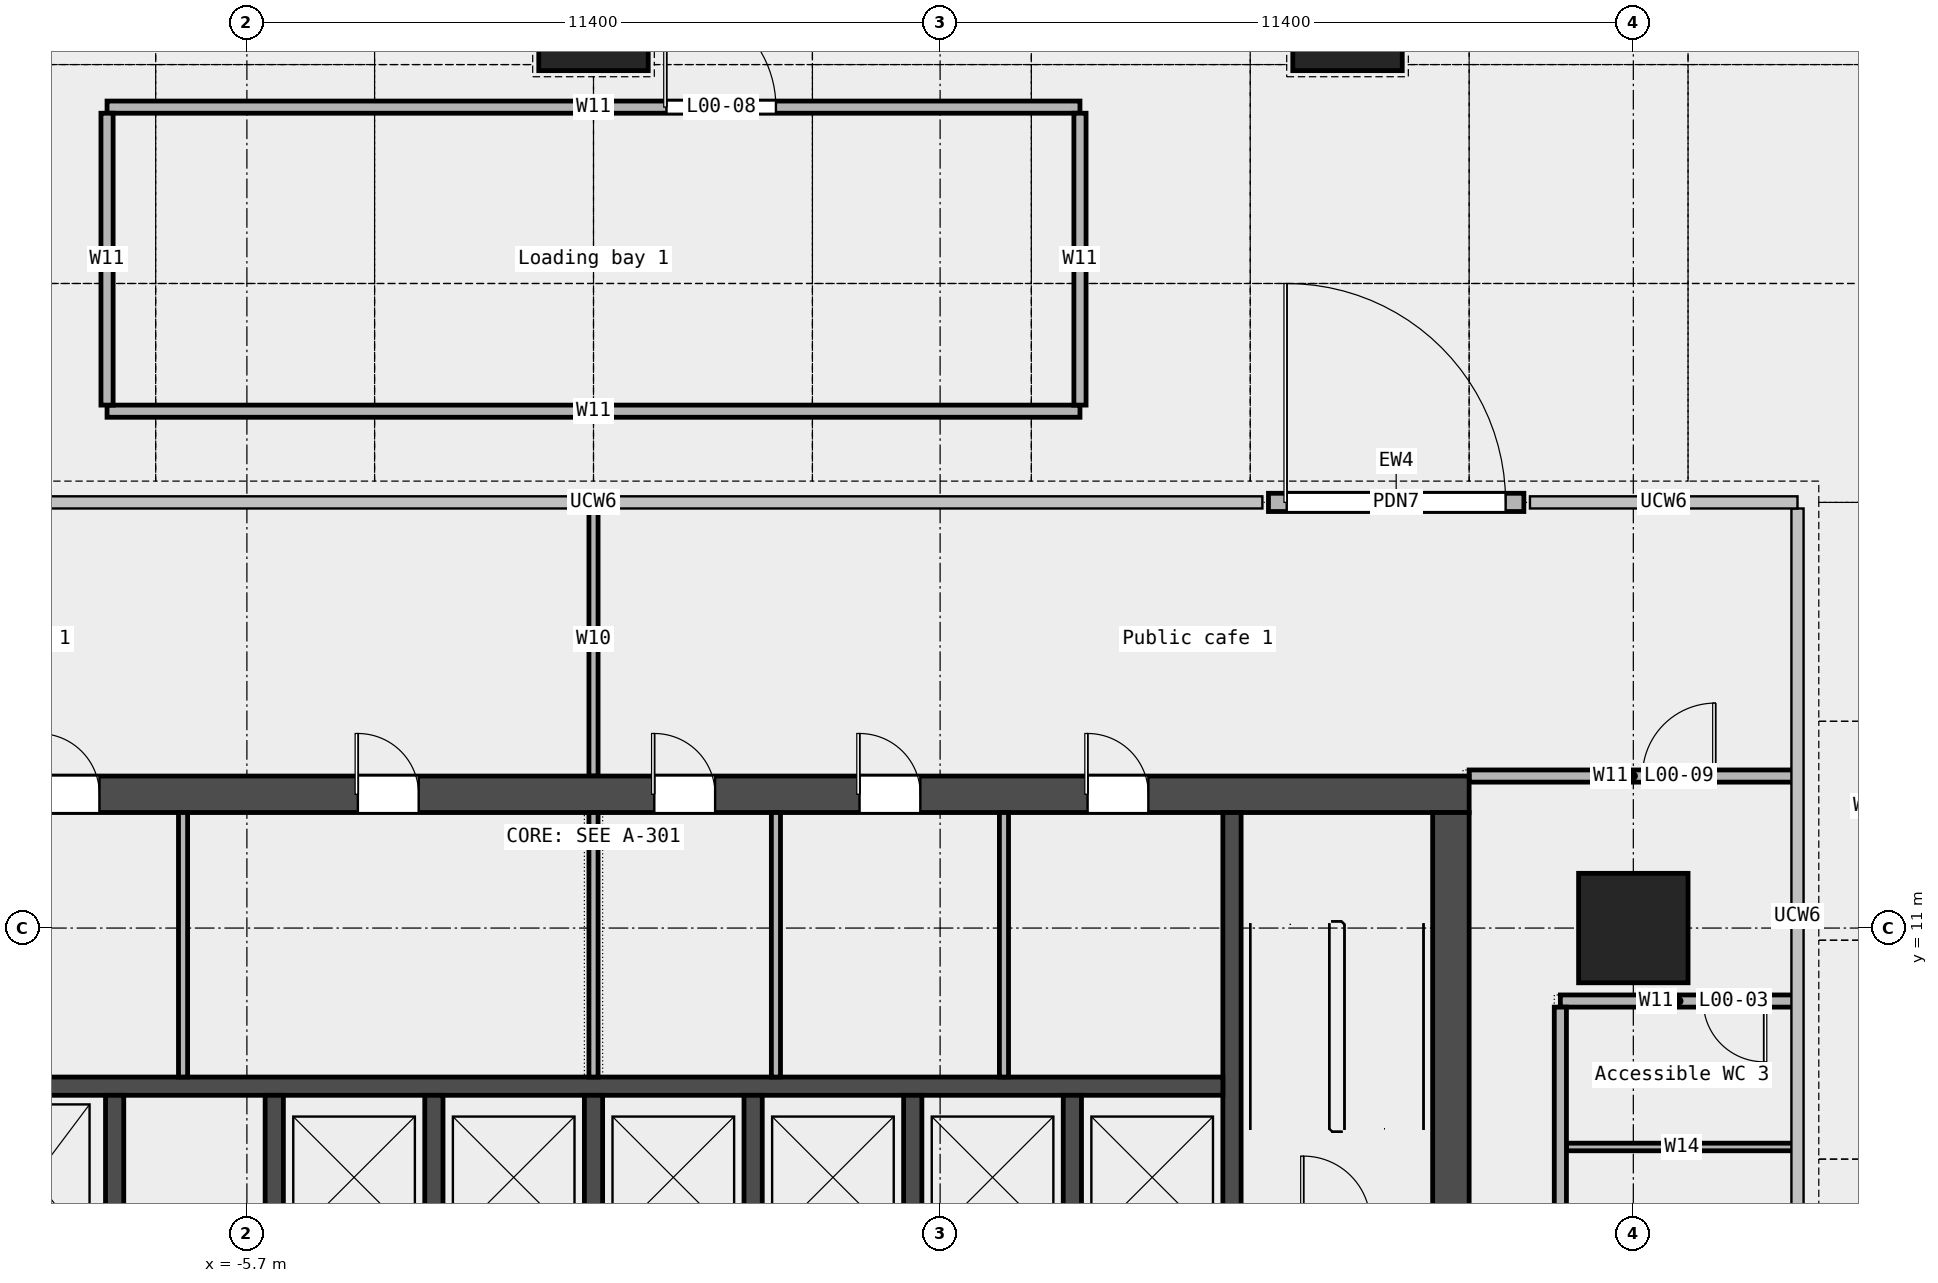
"""IFC4 building model, lengths in metres.
Left out: names, types, materials, properties, quantities, classifications, styles, units other than length and angle.
Written with IfcOpenShell. Run it as: python <this file> out.ifc"""

import sys

from ifc_helpers import new_model, si_unit, direction, frame, frame_2d, origin, origin_2d, place, context, subcontext, project, spatial, rectangle, extrude, element, fill, save


model = new_model("IFC4")
c1 = context("Model", 3, precision=1e-05, world=origin(), true_north=direction((0.0, 1.0)))
c2 = subcontext(c1, "Body", "Model", "MODEL_VIEW")
j1 = project(units=[si_unit("LENGTHUNIT", "METRE"), si_unit("PLANEANGLEUNIT", "RADIAN")], contexts=[c1])
p1 = place(None, origin())
s1 = spatial("IfcSite", under=j1, at=p1, CompositionType="ELEMENT")
p2 = place(p1, origin())
s2 = spatial("IfcBuilding", under=s1, at=p2, CompositionType="ELEMENT")
p3 = place(p2, origin())
s3 = spatial("IfcBuildingStorey", under=s2, at=p3, CompositionType="ELEMENT", Elevation=0.0)
for number, where, z_axis, x_axis in (
    (1, (12.4, 26.0, 0.0), (0.0, 0.0, 1.0), (1.0, 0.0, 0.0)),
    (2, (0.0, 26.0, 0.0), (0.0, 0.0, 1.0), (1.0, 0.0, 0.0)),
    (3, (17.1, 11.0, 0.0), (0.0, 0.0, 1.0), (1.0, 0.0, 0.0)),
):
    element("IfcColumn", number, at=place(p3, frame(where, z_axis=z_axis, x_axis=x_axis)), inside=s3, PredefinedType="COLUMN", context=c2, shape_type="SweptSolid", body=[
        extrude(rectangle(XDim=1.8, YDim=1.8, at=origin_2d()), origin(), (0.0, 0.0, 1.0), 7.8),
    ])
p4 = place(p3, frame((11.1, 18.0, 0.0), z_axis=(0.0, 0.0, 1.0), x_axis=(1.0, 0.0, 0.0)))
e4 = element("IfcWall", 4, at=p4, inside=s3, PredefinedType="STANDARD", context=c2, shape_type="SweptSolid", body=[
    extrude(rectangle(XDim=4.2, YDim=0.3, at=frame_2d((2.1, 0.0))), origin(), (0.0, 0.0, 1.0), 7.8),
])
p5 = place(p4, frame((0.3, 0.0, 0.0)))
e5 = element("IfcOpeningElement", 5, at=p5, cuts=e4, PredefinedType="OPENING", context=c2, shape_type="SweptSolid", body=[
    extrude(rectangle(XDim=3.6, YDim=4.5, at=frame_2d((1.8, 2.25))), frame((0.0, 0.162, 0.0), z_axis=(0.0, -1.0, 0.0), x_axis=(1.0, 0.0, 0.0)), (0.0, 0.0, 1.0), 0.324),
])
p6 = place(p3, frame((16.0, 7.4, 0.0), z_axis=(0.0, 0.0, 1.0), x_axis=(1.0, 0.0, 0.0)))
e6 = element("IfcWall", 6, at=p6, inside=s3, PredefinedType="PARTITIONING", context=c2, shape_type="SweptSolid", body=[
    extrude(rectangle(XDim=3.8, YDim=0.125, at=frame_2d((1.9, 0.0))), origin(), (0.0, 0.0, 1.0), 7.8),
])
p7 = place(p3, frame((15.9, 9.8, 0.0), z_axis=(0.0, 0.0, 1.0), x_axis=(1.0, 0.0, 0.0)))
e7 = element("IfcWall", 7, at=p7, inside=s3, PredefinedType="PARTITIONING", context=c2, shape_type="SweptSolid", body=[
    extrude(rectangle(XDim=3.9, YDim=0.2, at=frame_2d((1.95, 0.0))), origin(), (0.0, 0.0, 1.0), 7.8),
])
p8 = place(p7, frame((2.35, 0.0, 0.0)))
e8 = element("IfcOpeningElement", 8, at=p8, cuts=e7, PredefinedType="OPENING", context=c2, shape_type="SweptSolid", body=[
    extrude(rectangle(XDim=1.0, YDim=2.1, at=frame_2d((0.5, 1.05))), frame((0.0, 0.112, 0.0), z_axis=(0.0, -1.0, 0.0), x_axis=(1.0, 0.0, 0.0)), (0.0, 0.0, 1.0), 0.224),
])
p9 = place(p3, frame((14.4, 13.5, 0.0), z_axis=(0.0, 0.0, 1.0), x_axis=(1.0, 0.0, 0.0)))
e9 = element("IfcWall", 9, at=p9, inside=s3, PredefinedType="PARTITIONING", context=c2, shape_type="SweptSolid", body=[
    extrude(rectangle(XDim=5.4, YDim=0.2, at=frame_2d((2.7, 0.0))), origin(), (0.0, 0.0, 1.0), 7.8),
])
p10 = place(p9, frame((2.85, 0.0, 0.0)))
e10 = element("IfcOpeningElement", 10, at=p10, cuts=e9, PredefinedType="OPENING", context=c2, shape_type="SweptSolid", body=[
    extrude(rectangle(XDim=1.2, YDim=2.1, at=frame_2d((0.6, 1.05))), frame((0.0, 0.112, 0.0), z_axis=(0.0, -1.0, 0.0), x_axis=(1.0, 0.0, 0.0)), (0.0, 0.0, 1.0), 0.224),
])
p11 = place(p3, frame((-8.0, 19.5, 0.0), z_axis=(0.0, 0.0, 1.0), x_axis=(1.0, 0.0, 0.0)))
e11 = element("IfcWall", 11, at=p11, inside=s3, PredefinedType="PARTITIONING", context=c2, shape_type="SweptSolid", body=[
    extrude(rectangle(XDim=16.0, YDim=0.2, at=frame_2d((8.0, 0.0))), origin(), (0.0, 0.0, 1.0), 7.8),
])
p12 = place(p3, frame((-8.0, 24.5, 0.0), z_axis=(0.0, 0.0, 1.0), x_axis=(1.0, 0.0, 0.0)))
e12 = element("IfcWall", 12, at=p12, inside=s3, PredefinedType="PARTITIONING", context=c2, shape_type="SweptSolid", body=[
    extrude(rectangle(XDim=16.0, YDim=0.2, at=frame_2d((8.0, 0.0))), origin(), (0.0, 0.0, 1.0), 7.8),
])
p13 = place(p12, frame((9.2, 0.0, 0.0)))
e13 = element("IfcOpeningElement", 13, at=p13, cuts=e12, PredefinedType="OPENING", context=c2, shape_type="SweptSolid", body=[
    extrude(rectangle(XDim=1.8, YDim=2.1, at=frame_2d((0.9, 1.05))), frame((0.0, 0.112, 0.0), z_axis=(0.0, -1.0, 0.0), x_axis=(1.0, 0.0, 0.0)), (0.0, 0.0, 1.0), 0.224),
])
p14 = place(p3, frame((-8.0, 19.6, 0.0), z_axis=(0.0, 0.0, 1.0), x_axis=(0.0, 1.0, 0.0)))
e14 = element("IfcWall", 14, at=p14, inside=s3, PredefinedType="PARTITIONING", context=c2, shape_type="SweptSolid", body=[
    extrude(rectangle(XDim=4.8, YDim=0.2, at=frame_2d((2.4, 0.0))), origin(), (0.0, 0.0, 1.0), 7.8),
])
p15 = place(p3, frame((0.0, 13.5, 0.0), z_axis=(0.0, 0.0, 1.0), x_axis=(0.0, 1.0, 0.0)))
e15 = element("IfcWall", 15, at=p15, inside=s3, PredefinedType="PARTITIONING", context=c2, shape_type="SweptSolid", body=[
    extrude(rectangle(XDim=4.5, YDim=0.15, at=frame_2d((2.25, 0.0))), origin(), (0.0, 0.0, 1.0), 7.8),
])
p16 = place(p3, frame((8.0, 19.6, 0.0), z_axis=(0.0, 0.0, 1.0), x_axis=(0.0, 1.0, 0.0)))
e16 = element("IfcWall", 16, at=p16, inside=s3, PredefinedType="PARTITIONING", context=c2, shape_type="SweptSolid", body=[
    extrude(rectangle(XDim=4.8, YDim=0.2, at=frame_2d((2.4, 0.0))), origin(), (0.0, 0.0, 1.0), 7.8),
])
p17 = place(p3, frame((15.9, -7.1, 0.0), z_axis=(0.0, 0.0, 1.0), x_axis=(0.0, 1.0, 0.0)))
e17 = element("IfcWall", 17, at=p17, inside=s3, PredefinedType="PARTITIONING", context=c2, shape_type="SweptSolid", body=[
    extrude(rectangle(XDim=16.8, YDim=0.2, at=frame_2d((8.4, 0.0))), origin(), (0.0, 0.0, 1.0), 7.8),
])
p18 = place(p17, frame((8.25, 0.0, 0.0)))
e18 = element("IfcOpeningElement", 18, at=p18, cuts=e17, PredefinedType="OPENING", context=c2, shape_type="SweptSolid", body=[
    extrude(rectangle(XDim=0.9, YDim=2.1, at=frame_2d((0.45, 1.05))), frame((0.0, 0.112, 0.0), z_axis=(0.0, -1.0, 0.0), x_axis=(1.0, 0.0, 0.0)), (0.0, 0.0, 1.0), 0.224),
])
p19 = place(p17, frame((2.1, 0.0, 0.0)))
e19 = element("IfcOpeningElement", 19, at=p19, cuts=e17, PredefinedType="OPENING", context=c2, shape_type="SweptSolid", body=[
    extrude(rectangle(XDim=0.9, YDim=2.1, at=frame_2d((0.45, 1.05))), frame((0.0, 0.112, 0.0), z_axis=(0.0, -1.0, 0.0), x_axis=(1.0, 0.0, 0.0)), (0.0, 0.0, 1.0), 0.224),
])
p20 = place(p17, frame((12.35, 0.0, 0.0)))
e20 = element("IfcOpeningElement", 20, at=p20, cuts=e17, PredefinedType="OPENING", context=c2, shape_type="SweptSolid", body=[
    extrude(rectangle(XDim=0.9, YDim=2.1, at=frame_2d((0.45, 1.05))), frame((0.0, 0.112, 0.0), z_axis=(0.0, -1.0, 0.0), x_axis=(1.0, 0.0, 0.0)), (0.0, 0.0, 1.0), 0.224),
])
p21 = place(p3, frame((-14.4, 13.2, 0.0), z_axis=(0.0, 0.0, 1.0), x_axis=(1.0, 0.0, 0.0)))
e21 = element("IfcWall", 21, at=p21, inside=s3, PredefinedType="SHEAR", context=c2, shape_type="SweptSolid", body=[
    extrude(rectangle(XDim=28.8, YDim=0.6, at=frame_2d((14.4, 0.0))), origin(), (0.0, 0.0, 1.0), 8.7),
])
p22 = place(p21, frame((5.275, 0.0, 0.0)))
e22 = element("IfcOpeningElement", 22, at=p22, cuts=e21, PredefinedType="OPENING", context=c2, shape_type="SweptSolid", body=[
    extrude(rectangle(XDim=1.0, YDim=2.1, at=frame_2d((0.5, 1.05))), frame((0.0, 0.312, 0.0), z_axis=(0.0, -1.0, 0.0), x_axis=(1.0, 0.0, 0.0)), (0.0, 0.0, 1.0), 0.624),
])
p23 = place(p21, frame((10.525, 0.0, 0.0)))
e23 = element("IfcOpeningElement", 23, at=p23, cuts=e21, PredefinedType="OPENING", context=c2, shape_type="SweptSolid", body=[
    extrude(rectangle(XDim=1.0, YDim=2.1, at=frame_2d((0.5, 1.05))), frame((0.0, 0.312, 0.0), z_axis=(0.0, -1.0, 0.0), x_axis=(1.0, 0.0, 0.0)), (0.0, 0.0, 1.0), 0.624),
])
p24 = place(p21, frame((15.4, 0.0, 0.0)))
e24 = element("IfcOpeningElement", 24, at=p24, cuts=e21, PredefinedType="OPENING", context=c2, shape_type="SweptSolid", body=[
    extrude(rectangle(XDim=1.0, YDim=2.1, at=frame_2d((0.5, 1.05))), frame((0.0, 0.312, 0.0), z_axis=(0.0, -1.0, 0.0), x_axis=(1.0, 0.0, 0.0)), (0.0, 0.0, 1.0), 0.624),
])
p25 = place(p21, frame((18.775, 0.0, 0.0)))
e25 = element("IfcOpeningElement", 25, at=p25, cuts=e21, PredefinedType="OPENING", context=c2, shape_type="SweptSolid", body=[
    extrude(rectangle(XDim=1.0, YDim=2.1, at=frame_2d((0.5, 1.05))), frame((0.0, 0.312, 0.0), z_axis=(0.0, -1.0, 0.0), x_axis=(1.0, 0.0, 0.0)), (0.0, 0.0, 1.0), 0.624),
])
p26 = place(p21, frame((22.525, 0.0, 0.0)))
e26 = element("IfcOpeningElement", 26, at=p26, cuts=e21, PredefinedType="OPENING", context=c2, shape_type="SweptSolid", body=[
    extrude(rectangle(XDim=1.0, YDim=2.1, at=frame_2d((0.5, 1.05))), frame((0.0, 0.312, 0.0), z_axis=(0.0, -1.0, 0.0), x_axis=(1.0, 0.0, 0.0)), (0.0, 0.0, 1.0), 0.624),
])
p27 = place(p3, frame((14.1, -6.6, 0.0), z_axis=(0.0, 0.0, 1.0), x_axis=(0.0, 1.0, 0.0)))
e27 = element("IfcWall", 27, at=p27, inside=s3, PredefinedType="SHEAR", context=c2, shape_type="SweptSolid", body=[
    extrude(rectangle(XDim=19.5, YDim=0.6, at=frame_2d((9.75, 0.0))), origin(), (0.0, 0.0, 1.0), 8.7),
])
p28 = place(p27, frame((9.3, 0.0, 0.0)))
e28 = element("IfcOpeningElement", 28, at=p28, cuts=e27, PredefinedType="OPENING", context=c2, shape_type="SweptSolid", body=[
    extrude(rectangle(XDim=1.8, YDim=2.1, at=frame_2d((0.9, 1.05))), frame((0.0, 0.312, 0.0), z_axis=(0.0, -1.0, 0.0), x_axis=(1.0, 0.0, 0.0)), (0.0, 0.0, 1.0), 0.624),
])
p29 = place(p3, frame((10.5, 5.25, 0.0), z_axis=(0.0, 0.0, 1.0), x_axis=(0.0, 1.0, 0.0)))
e29 = element("IfcWall", 29, at=p29, inside=s3, PredefinedType="SHEAR", context=c2, shape_type="SweptSolid", body=[
    extrude(rectangle(XDim=7.65, YDim=0.3, at=frame_2d((3.825, 0.0))), origin(), (0.0, 0.0, 1.0), 8.7),
])
p30 = place(p3, frame((-10.35, 8.4, -1.8), z_axis=(0.0, 0.0, 1.0), x_axis=(1.0, 0.0, 0.0)))
e30 = element("IfcWall", 30, at=p30, inside=s3, PredefinedType="SOLIDWALL", context=c2, shape_type="SweptSolid", body=[
    extrude(rectangle(XDim=20.7, YDim=0.3, at=frame_2d((10.35, 0.0))), origin(), (0.0, 0.0, 1.0), 10.5),
])
for number, where, z_axis, x_axis in (
    (31, (-7.875, 5.55, -1.8), (0.0, 0.0, 1.0), (0.0, 1.0, 0.0)),
    (32, (-5.25, 5.55, -1.8), (0.0, 0.0, 1.0), (0.0, 1.0, 0.0)),
    (33, (-2.625, 5.55, -1.8), (0.0, 0.0, 1.0), (0.0, 1.0, 0.0)),
    (34, (0.0, 5.55, -1.8), (0.0, 0.0, 1.0), (0.0, 1.0, 0.0)),
    (35, (2.625, 5.55, -1.8), (0.0, 0.0, 1.0), (0.0, 1.0, 0.0)),
    (36, (5.25, 5.55, -1.8), (0.0, 0.0, 1.0), (0.0, 1.0, 0.0)),
    (37, (7.875, 5.55, -1.8), (0.0, 0.0, 1.0), (0.0, 1.0, 0.0)),
):
    element("IfcWall", number, at=place(p3, frame(where, z_axis=z_axis, x_axis=x_axis)), inside=s3, PredefinedType="SOLIDWALL", context=c2, shape_type="SweptSolid", body=[
        extrude(rectangle(XDim=2.7, YDim=0.3, at=frame_2d((1.35, 0.0))), origin(), (0.0, 0.0, 1.0), 10.5),
    ])
for number, where, z_axis, x_axis in (
    (38, (-6.75, 8.55, 0.0), (0.0, 0.0, 1.0), (0.0, 1.0, 0.0)),
    (39, (0.0, 8.55, 0.0), (0.0, 0.0, 1.0), (0.0, 1.0, 0.0)),
    (40, (3.0, 8.55, 0.0), (0.0, 0.0, 1.0), (0.0, 1.0, 0.0)),
    (41, (6.75, 8.55, 0.0), (0.0, 0.0, 1.0), (0.0, 1.0, 0.0)),
):
    element("IfcWall", number, at=place(p3, frame(where, z_axis=z_axis, x_axis=x_axis)), inside=s3, PredefinedType="PARTITIONING", context=c2, shape_type="SweptSolid", body=[
        extrude(rectangle(XDim=4.35, YDim=0.15, at=frame_2d((2.175, 0.0))), origin(), (0.0, 0.0, 1.0), 8.7),
    ])
p31 = place(p5, origin())
e42 = element("IfcDoor", 42, at=p31, inside=s3, OperationType="ROLLINGUP", PredefinedType="DOOR", context=c2, shape_type="SweptSolid", body=[
    extrude(rectangle(XDim=3.6, YDim=4.5, at=frame_2d((1.8, 2.25))), frame((0.0, 0.025, 0.0), z_axis=(0.0, -1.0, 0.0), x_axis=(1.0, 0.0, 0.0)), (0.0, 0.0, 1.0), 0.05),
])
fill(e5, e42)
p32 = place(p8, origin())
e43 = element("IfcDoor", 43, at=p32, inside=s3, OperationType="SINGLE_SWING_LEFT", PredefinedType="DOOR", context=c2, shape_type="SweptSolid", body=[
    extrude(rectangle(XDim=1.0, YDim=2.1, at=frame_2d((0.5, 1.05))), frame((0.0, 0.025, 0.0), z_axis=(0.0, -1.0, 0.0), x_axis=(1.0, 0.0, 0.0)), (0.0, 0.0, 1.0), 0.05),
])
fill(e8, e43)
p33 = place(p13, origin())
e44 = element("IfcDoor", 44, at=p33, inside=s3, OperationType="DOUBLE_DOOR_SINGLE_SWING", PredefinedType="DOOR", context=c2, shape_type="SweptSolid", body=[
    extrude(rectangle(XDim=1.8, YDim=2.1, at=frame_2d((0.9, 1.05))), frame((0.0, 0.025, 0.0), z_axis=(0.0, -1.0, 0.0), x_axis=(1.0, 0.0, 0.0)), (0.0, 0.0, 1.0), 0.05),
])
fill(e13, e44)
p34 = place(p10, origin())
e45 = element("IfcDoor", 45, at=p34, inside=s3, OperationType="SINGLE_SWING_RIGHT", PredefinedType="DOOR", context=c2, shape_type="SweptSolid", body=[
    extrude(rectangle(XDim=1.2, YDim=2.1, at=frame_2d((0.6, 1.05))), frame((0.0, 0.025, 0.0), z_axis=(0.0, -1.0, 0.0), x_axis=(1.0, 0.0, 0.0)), (0.0, 0.0, 1.0), 0.05),
])
fill(e10, e45)
p35 = place(p22, origin())
e46 = element("IfcDoor", 46, at=p35, inside=s3, OperationType="SINGLE_SWING_LEFT", PredefinedType="DOOR", context=c2, shape_type="SweptSolid", body=[
    extrude(rectangle(XDim=1.0, YDim=2.1, at=frame_2d((0.5, 1.05))), frame((0.0, 0.025, 0.0), z_axis=(0.0, -1.0, 0.0), x_axis=(1.0, 0.0, 0.0)), (0.0, 0.0, 1.0), 0.05),
])
fill(e22, e46)
p36 = place(p23, origin())
e47 = element("IfcDoor", 47, at=p36, inside=s3, OperationType="SINGLE_SWING_LEFT", PredefinedType="DOOR", context=c2, shape_type="SweptSolid", body=[
    extrude(rectangle(XDim=1.0, YDim=2.1, at=frame_2d((0.5, 1.05))), frame((0.0, 0.025, 0.0), z_axis=(0.0, -1.0, 0.0), x_axis=(1.0, 0.0, 0.0)), (0.0, 0.0, 1.0), 0.05),
])
fill(e23, e47)
p37 = place(p24, origin())
e48 = element("IfcDoor", 48, at=p37, inside=s3, OperationType="SINGLE_SWING_LEFT", PredefinedType="DOOR", context=c2, shape_type="SweptSolid", body=[
    extrude(rectangle(XDim=1.0, YDim=2.1, at=frame_2d((0.5, 1.05))), frame((0.0, 0.025, 0.0), z_axis=(0.0, -1.0, 0.0), x_axis=(1.0, 0.0, 0.0)), (0.0, 0.0, 1.0), 0.05),
])
fill(e24, e48)
p38 = place(p25, origin())
e49 = element("IfcDoor", 49, at=p38, inside=s3, OperationType="SINGLE_SWING_LEFT", PredefinedType="DOOR", context=c2, shape_type="SweptSolid", body=[
    extrude(rectangle(XDim=1.0, YDim=2.1, at=frame_2d((0.5, 1.05))), frame((0.0, 0.025, 0.0), z_axis=(0.0, -1.0, 0.0), x_axis=(1.0, 0.0, 0.0)), (0.0, 0.0, 1.0), 0.05),
])
fill(e25, e49)
p39 = place(p26, origin())
e50 = element("IfcDoor", 50, at=p39, inside=s3, OperationType="SINGLE_SWING_LEFT", PredefinedType="DOOR", context=c2, shape_type="SweptSolid", body=[
    extrude(rectangle(XDim=1.0, YDim=2.1, at=frame_2d((0.5, 1.05))), frame((0.0, 0.025, 0.0), z_axis=(0.0, -1.0, 0.0), x_axis=(1.0, 0.0, 0.0)), (0.0, 0.0, 1.0), 0.05),
])
fill(e26, e50)
save(model, sys.argv[1])
